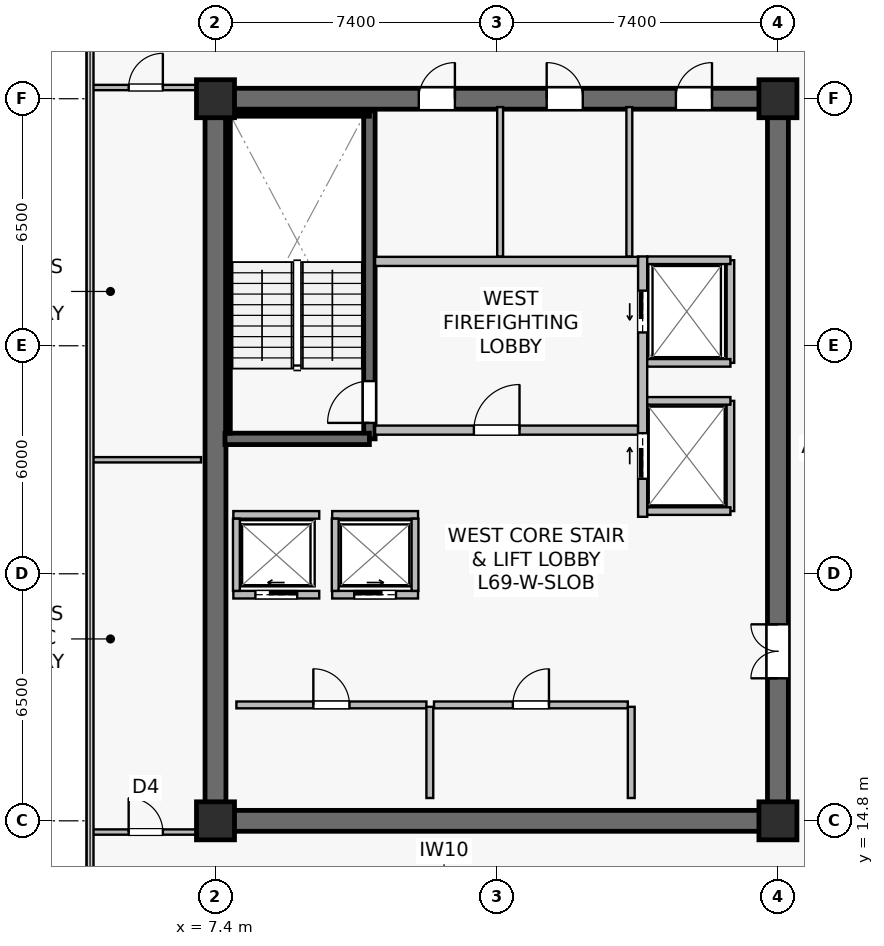
"""IFC4 building model, lengths in metres.
Left out: names, types, materials, properties, quantities, classifications, styles, units other than length and angle.
Written with IfcOpenShell. Run it as: python <this file> out.ifc"""

import sys

from ifc_helpers import new_model, si_unit, direction, frame, frame_2d, origin, origin_2d, place, context, subcontext, project, spatial, rectangle, extrude, source, transform, mapped, element, fill, save


model = new_model("IFC4")
c1 = context("Model", 3, precision=1e-05, world=origin(), true_north=direction((0.0, 1.0)))
c2 = subcontext(c1, "Body", "Model", "MODEL_VIEW")
j1 = project(units=[si_unit("LENGTHUNIT", "METRE"), si_unit("PLANEANGLEUNIT", "RADIAN")], contexts=[c1])
p1 = place(None, origin())
s1 = spatial("IfcSite", under=j1, at=p1, CompositionType="ELEMENT")
p2 = place(p1, origin())
s2 = spatial("IfcBuilding", under=s1, at=p2, CompositionType="ELEMENT")
p3 = place(p2, frame((0.0, 0.0, 287.5)))
s3 = spatial("IfcBuildingStorey", under=s2, at=p3, CompositionType="ELEMENT", Elevation=287.5)
p4 = place(p3, frame((7.125, 14.8, 0.0), z_axis=(0.0, 0.0, 1.0), x_axis=(1.0, 0.0, 0.0)))
e1 = element("IfcWall", 1, at=p4, inside=s3, PredefinedType="SHEAR", context=c2, shape_type="SweptSolid", body=[
    extrude(rectangle(XDim=15.35, YDim=0.55, at=frame_2d((7.675, 0.0))), origin(), (0.0, 0.0, 1.0), 3.8),
])
p5 = place(p3, frame((7.125, 33.8, 0.0), z_axis=(0.0, 0.0, 1.0), x_axis=(1.0, 0.0, 0.0)))
e2 = element("IfcWall", 2, at=p5, inside=s3, PredefinedType="SHEAR", context=c2, shape_type="SweptSolid", body=[
    extrude(rectangle(XDim=15.35, YDim=0.55, at=frame_2d((7.675, 0.0))), origin(), (0.0, 0.0, 1.0), 3.8),
])
p6 = place(p5, frame((5.625, 0.0, 0.0)))
e3 = element("IfcOpeningElement", 3, at=p6, cuts=e2, PredefinedType="OPENING", context=c2, shape_type="SweptSolid", body=[
    extrude(rectangle(XDim=0.95, YDim=2.15, at=frame_2d((0.475, 1.075))), frame((0.0, 0.285, 0.0), z_axis=(0.0, -1.0, 0.0), x_axis=(1.0, 0.0, 0.0)), (0.0, 0.0, 1.0), 0.57),
])
p7 = place(p5, frame((8.99, 0.0, 0.0)))
e4 = element("IfcOpeningElement", 4, at=p7, cuts=e2, PredefinedType="OPENING", context=c2, shape_type="SweptSolid", body=[
    extrude(rectangle(XDim=0.95, YDim=2.15, at=frame_2d((0.475, 1.075))), frame((0.0, 0.285, 0.0), z_axis=(0.0, -1.0, 0.0), x_axis=(1.0, 0.0, 0.0)), (0.0, 0.0, 1.0), 0.57),
])
p8 = place(p5, frame((12.39, 0.0, 0.0)))
e5 = element("IfcOpeningElement", 5, at=p8, cuts=e2, PredefinedType="OPENING", context=c2, shape_type="SweptSolid", body=[
    extrude(rectangle(XDim=0.95, YDim=2.15, at=frame_2d((0.475, 1.075))), frame((0.0, 0.285, 0.0), z_axis=(0.0, -1.0, 0.0), x_axis=(1.0, 0.0, 0.0)), (0.0, 0.0, 1.0), 0.57),
])
p9 = place(p3, frame((7.4, 15.075, 0.0), z_axis=(0.0, 0.0, 1.0), x_axis=(0.0, 1.0, 0.0)))
e6 = element("IfcWall", 6, at=p9, inside=s3, PredefinedType="SHEAR", context=c2, shape_type="SweptSolid", body=[
    extrude(rectangle(XDim=18.45, YDim=0.55, at=frame_2d((9.225, 0.0))), origin(), (0.0, 0.0, 1.0), 3.8),
])
p10 = place(p3, frame((22.2, 15.075, 0.0), z_axis=(0.0, 0.0, 1.0), x_axis=(0.0, 1.0, 0.0)))
e7 = element("IfcWall", 7, at=p10, inside=s3, PredefinedType="SHEAR", context=c2, shape_type="SweptSolid", body=[
    extrude(rectangle(XDim=18.45, YDim=0.55, at=frame_2d((9.225, 0.0))), origin(), (0.0, 0.0, 1.0), 3.8),
])
p11 = place(p10, frame((3.475, 0.0, 0.0)))
e8 = element("IfcOpeningElement", 8, at=p11, cuts=e7, PredefinedType="OPENING", context=c2, shape_type="SweptSolid", body=[
    extrude(rectangle(XDim=1.42, YDim=2.2, at=frame_2d((0.71, 1.1))), frame((0.0, 0.285, 0.0), z_axis=(0.0, -1.0, 0.0), x_axis=(1.0, 0.0, 0.0)), (0.0, 0.0, 1.0), 0.57),
])
p12 = place(p3, frame((11.45, 24.85, 0.0), z_axis=(0.0, 0.0, 1.0), x_axis=(0.0, 1.0, 0.0)))
e9 = element("IfcWall", 9, at=p12, inside=s3, PredefinedType="SHEAR", context=c2, shape_type="SweptSolid", body=[
    extrude(rectangle(XDim=8.63, YDim=0.3, at=frame_2d((4.315, 0.0))), origin(), (0.0, 0.0, 1.0), 3.8),
])
p13 = place(p12, frame((0.42, 0.0, 0.0)))
e10 = element("IfcOpeningElement", 10, at=p13, cuts=e9, PredefinedType="OPENING", context=c2, shape_type="SweptSolid", body=[
    extrude(rectangle(XDim=1.1, YDim=2.15, at=frame_2d((0.55, 1.075))), frame((0.0, 0.16, 0.0), z_axis=(0.0, -1.0, 0.0), x_axis=(1.0, 0.0, 0.0)), (0.0, 0.0, 1.0), 0.32),
])
p14 = place(p3, frame((7.65, 24.85, 0.0), z_axis=(0.0, 0.0, 1.0), x_axis=(1.0, 0.0, 0.0)))
e11 = element("IfcWall", 11, at=p14, inside=s3, PredefinedType="SHEAR", context=c2, shape_type="SweptSolid", body=[
    extrude(rectangle(XDim=3.8, YDim=0.3, at=frame_2d((1.9, 0.0))), origin(), (0.0, 0.0, 1.0), 3.8),
])
p15 = place(p3, frame((7.73, 33.4, 0.0), z_axis=(0.0, 0.0, 1.0), x_axis=(1.0, 0.0, 0.0)))
e12 = element("IfcWall", 12, at=p15, inside=s3, PredefinedType="SOLIDWALL", context=c2, shape_type="SweptSolid", body=[
    extrude(rectangle(XDim=3.72, YDim=0.12, at=frame_2d((1.86, 0.0))), origin(), (0.0, 0.0, 1.0), 3.8),
])
p16 = place(p3, frame((7.73, 25.0, 0.0), z_axis=(0.0, 0.0, 1.0), x_axis=(0.0, 1.0, 0.0)))
e13 = element("IfcWall", 13, at=p16, inside=s3, PredefinedType="SOLIDWALL", context=c2, shape_type="SweptSolid", body=[
    extrude(rectangle(XDim=8.32, YDim=0.12, at=frame_2d((4.16, 0.0))), origin(), (0.0, 0.0, 1.0), 3.8),
])
m1 = source(origin(), c2, "Body", "SweptSolid", [
    extrude(rectangle(XDim=1.0, YDim=1.0, at=origin_2d()), origin(), (0.0, 0.0, 1.0), 4.1),
])
for number, where, z_axis, x_axis in (
    (14, (7.4, 14.8, 0.0), (0.0, 0.0, 1.0), (1.0, 0.0, 0.0)),
    (15, (22.2, 14.8, 0.0), (0.0, 0.0, 1.0), (1.0, 0.0, 0.0)),
    (16, (7.4, 33.8, 0.0), (0.0, 0.0, 1.0), (1.0, 0.0, 0.0)),
    (17, (22.2, 33.8, 0.0), (0.0, 0.0, 1.0), (1.0, 0.0, 0.0)),
):
    element("IfcColumn", number, at=place(p3, frame(where, z_axis=z_axis, x_axis=x_axis)), inside=s3, PredefinedType="COLUMN", context=c2, shape_type="MappedRepresentation", body=[
        mapped(m1, transform((0.0, 0.0, 0.0), scale=1.0)),
    ])
p17 = place(p3, frame((11.6, 25.08, 0.0), z_axis=(0.0, 0.0, 1.0), x_axis=(1.0, 0.0, 0.0)))
e18 = element("IfcWall", 18, at=p17, inside=s3, PredefinedType="SOLIDWALL", context=c2, shape_type="SweptSolid", body=[
    extrude(rectangle(XDim=6.92, YDim=0.24, at=frame_2d((3.46, 0.0))), origin(), (0.0, 0.0, 1.0), 3.197),
])
p18 = place(p17, frame((2.6, 0.0, 0.0)))
e19 = element("IfcOpeningElement", 19, at=p18, cuts=e18, PredefinedType="OPENING", context=c2, shape_type="SweptSolid", body=[
    extrude(rectangle(XDim=1.2, YDim=2.16, at=frame_2d((0.6, 1.08))), frame((0.0, 0.13, 0.0), z_axis=(0.0, -1.0, 0.0), x_axis=(1.0, 0.0, 0.0)), (0.0, 0.0, 1.0), 0.26),
])
p19 = place(p3, frame((11.6, 29.52, 0.0), z_axis=(0.0, 0.0, 1.0), x_axis=(1.0, 0.0, 0.0)))
e20 = element("IfcWall", 20, at=p19, inside=s3, PredefinedType="SOLIDWALL", context=c2, shape_type="SweptSolid", body=[
    extrude(rectangle(XDim=6.92, YDim=0.24, at=frame_2d((3.46, 0.0))), origin(), (0.0, 0.0, 1.0), 3.197),
])
p20 = place(p3, frame((18.64, 22.8, 0.0), z_axis=(0.0, 0.0, 1.0), x_axis=(0.0, 1.0, 0.0)))
e21 = element("IfcWall", 21, at=p20, inside=s3, PredefinedType="SOLIDWALL", context=c2, shape_type="SweptSolid", body=[
    extrude(rectangle(XDim=6.85, YDim=0.24, at=frame_2d((3.425, 0.0))), origin(), (0.0, 0.0, 1.0), 2.935),
])
p21 = place(p20, frame((4.85, 0.0, 0.0)))
e22 = element("IfcOpeningElement", 22, at=p21, cuts=e21, PredefinedType="OPENING", context=c2, shape_type="SweptSolid", body=[
    extrude(rectangle(XDim=1.1, YDim=2.22, at=frame_2d((0.55, 1.11))), frame((0.0, 0.13, 0.0), z_axis=(0.0, -1.0, 0.0), x_axis=(1.0, 0.0, 0.0)), (0.0, 0.0, 1.0), 0.26),
])
p22 = place(p20, frame((1.0, 0.0, 0.0)))
e23 = element("IfcOpeningElement", 23, at=p22, cuts=e21, PredefinedType="OPENING", context=c2, shape_type="SweptSolid", body=[
    extrude(rectangle(XDim=1.2, YDim=2.22, at=frame_2d((0.6, 1.11))), frame((0.0, 0.13, 0.0), z_axis=(0.0, -1.0, 0.0), x_axis=(1.0, 0.0, 0.0)), (0.0, 0.0, 1.0), 0.26),
])
p23 = place(p3, frame((7.87, 20.75, 0.0), z_axis=(0.0, 0.0, 1.0), x_axis=(1.0, 0.0, 0.0)))
e24 = element("IfcWall", 24, at=p23, inside=s3, PredefinedType="SOLIDWALL", context=c2, shape_type="SweptSolid", body=[
    extrude(rectangle(XDim=2.26, YDim=0.2, at=frame_2d((1.13, 0.0))), origin(), (0.0, 0.0, 1.0), 3.8),
])
p24 = place(p23, frame((0.58, 0.0, 0.0)))
e25 = element("IfcOpeningElement", 25, at=p24, cuts=e24, PredefinedType="OPENING", context=c2, shape_type="SweptSolid", body=[
    extrude(rectangle(XDim=1.1, YDim=2.22, at=frame_2d((0.55, 1.11))), frame((0.0, 0.11, 0.0), z_axis=(0.0, -1.0, 0.0), x_axis=(1.0, 0.0, 0.0)), (0.0, 0.0, 1.0), 0.22),
])
p25 = place(p3, frame((7.87, 22.85, 0.0), z_axis=(0.0, 0.0, 1.0), x_axis=(1.0, 0.0, 0.0)))
e26 = element("IfcWall", 26, at=p25, inside=s3, PredefinedType="SOLIDWALL", context=c2, shape_type="SweptSolid", body=[
    extrude(rectangle(XDim=2.26, YDim=0.2, at=frame_2d((1.13, 0.0))), origin(), (0.0, 0.0, 1.0), 3.8),
])
p26 = place(p3, frame((7.95, 20.85, 0.0), z_axis=(0.0, 0.0, 1.0), x_axis=(0.0, 1.0, 0.0)))
e27 = element("IfcWall", 27, at=p26, inside=s3, PredefinedType="SOLIDWALL", context=c2, shape_type="SweptSolid", body=[
    extrude(rectangle(XDim=1.9, YDim=0.18, at=frame_2d((0.95, 0.0))), origin(), (0.0, 0.0, 1.0), 3.8),
])
p27 = place(p3, frame((10.47, 20.75, 0.0), z_axis=(0.0, 0.0, 1.0), x_axis=(1.0, 0.0, 0.0)))
e28 = element("IfcWall", 28, at=p27, inside=s3, PredefinedType="SOLIDWALL", context=c2, shape_type="SweptSolid", body=[
    extrude(rectangle(XDim=2.26, YDim=0.2, at=frame_2d((1.13, 0.0))), origin(), (0.0, 0.0, 1.0), 3.8),
])
p28 = place(p27, frame((0.58, 0.0, 0.0)))
e29 = element("IfcOpeningElement", 29, at=p28, cuts=e28, PredefinedType="OPENING", context=c2, shape_type="SweptSolid", body=[
    extrude(rectangle(XDim=1.1, YDim=2.22, at=frame_2d((0.55, 1.11))), frame((0.0, 0.11, 0.0), z_axis=(0.0, -1.0, 0.0), x_axis=(1.0, 0.0, 0.0)), (0.0, 0.0, 1.0), 0.22),
])
p29 = place(p3, frame((10.47, 22.85, 0.0), z_axis=(0.0, 0.0, 1.0), x_axis=(1.0, 0.0, 0.0)))
e30 = element("IfcWall", 30, at=p29, inside=s3, PredefinedType="SOLIDWALL", context=c2, shape_type="SweptSolid", body=[
    extrude(rectangle(XDim=2.26, YDim=0.2, at=frame_2d((1.13, 0.0))), origin(), (0.0, 0.0, 1.0), 3.8),
])
for number, where, z_axis, x_axis in (
    (31, (10.55, 20.85, 0.0), (0.0, 0.0, 1.0), (0.0, 1.0, 0.0)),
    (32, (12.65, 20.85, 0.0), (0.0, 0.0, 1.0), (0.0, 1.0, 0.0)),
):
    element("IfcWall", number, at=place(p3, frame(where, z_axis=z_axis, x_axis=x_axis)), inside=s3, PredefinedType="SOLIDWALL", context=c2, shape_type="SweptSolid", body=[
        extrude(rectangle(XDim=1.9, YDim=0.18, at=frame_2d((0.95, 0.0))), origin(), (0.0, 0.0, 1.0), 3.8),
    ])
p30 = place(p3, frame((20.95, 26.85, 0.0), z_axis=(0.0, 0.0, 1.0), x_axis=(0.0, 1.0, 0.0)))
e33 = element("IfcWall", 33, at=p30, inside=s3, PredefinedType="SOLIDWALL", context=c2, shape_type="SweptSolid", body=[
    extrude(rectangle(XDim=2.7, YDim=0.2, at=frame_2d((1.35, 0.0))), origin(), (0.0, 0.0, 1.0), 3.8),
])
p31 = place(p3, frame((18.76, 29.55, 0.0), z_axis=(0.0, 0.0, 1.0), x_axis=(1.0, 0.0, 0.0)))
e34 = element("IfcWall", 34, at=p31, inside=s3, PredefinedType="SOLIDWALL", context=c2, shape_type="SweptSolid", body=[
    extrude(rectangle(XDim=2.19, YDim=0.2, at=frame_2d((1.095, 0.0))), origin(), (0.0, 0.0, 1.0), 3.8),
])
p32 = place(p3, frame((18.76, 26.85, 0.0), z_axis=(0.0, 0.0, 1.0), x_axis=(1.0, 0.0, 0.0)))
e35 = element("IfcWall", 35, at=p32, inside=s3, PredefinedType="SOLIDWALL", context=c2, shape_type="SweptSolid", body=[
    extrude(rectangle(XDim=2.19, YDim=0.2, at=frame_2d((1.095, 0.0))), origin(), (0.0, 0.0, 1.0), 3.197),
])
p33 = place(p3, frame((20.95, 22.95, 0.0), z_axis=(0.0, 0.0, 1.0), x_axis=(0.0, 1.0, 0.0)))
e36 = element("IfcWall", 36, at=p33, inside=s3, PredefinedType="SOLIDWALL", context=c2, shape_type="SweptSolid", body=[
    extrude(rectangle(XDim=2.9, YDim=0.2, at=frame_2d((1.45, 0.0))), origin(), (0.0, 0.0, 1.0), 2.935),
])
for number, where, z_axis, x_axis in (
    (37, (18.76, 25.85, 0.0), (0.0, 0.0, 1.0), (1.0, 0.0, 0.0)),
    (38, (18.76, 22.95, 0.0), (0.0, 0.0, 1.0), (1.0, 0.0, 0.0)),
):
    element("IfcWall", number, at=place(p3, frame(where, z_axis=z_axis, x_axis=x_axis)), inside=s3, PredefinedType="SOLIDWALL", context=c2, shape_type="SweptSolid", body=[
        extrude(rectangle(XDim=2.19, YDim=0.2, at=frame_2d((1.095, 0.0))), origin(), (0.0, 0.0, 1.0), 3.8),
    ])
p34 = place(p3, frame((7.95, 17.85, 0.0), z_axis=(0.0, 0.0, 1.0), x_axis=(1.0, 0.0, 0.0)))
e39 = element("IfcWall", 39, at=p34, inside=s3, PredefinedType="SOLIDWALL", context=c2, shape_type="SweptSolid", body=[
    extrude(rectangle(XDim=5.0, YDim=0.18, at=frame_2d((2.5, 0.0))), origin(), (0.0, 0.0, 1.0), 3.8),
])
p35 = place(p34, frame((2.025, 0.0, 0.0)))
e40 = element("IfcOpeningElement", 40, at=p35, cuts=e39, PredefinedType="OPENING", context=c2, shape_type="SweptSolid", body=[
    extrude(rectangle(XDim=0.95, YDim=2.15, at=frame_2d((0.475, 1.075))), frame((0.0, 0.1, 0.0), z_axis=(0.0, -1.0, 0.0), x_axis=(1.0, 0.0, 0.0)), (0.0, 0.0, 1.0), 0.2),
])
p36 = place(p3, frame((13.04, 15.4, 0.0), z_axis=(0.0, 0.0, 1.0), x_axis=(0.0, 1.0, 0.0)))
e41 = element("IfcWall", 41, at=p36, inside=s3, PredefinedType="SOLIDWALL", context=c2, shape_type="SweptSolid", body=[
    extrude(rectangle(XDim=2.4, YDim=0.18, at=frame_2d((1.2, 0.0))), origin(), (0.0, 0.0, 1.0), 3.8),
])
p37 = place(p3, frame((13.15, 17.85, 0.0), z_axis=(0.0, 0.0, 1.0), x_axis=(1.0, 0.0, 0.0)))
e42 = element("IfcWall", 42, at=p37, inside=s3, PredefinedType="SOLIDWALL", context=c2, shape_type="SweptSolid", body=[
    extrude(rectangle(XDim=5.1, YDim=0.18, at=frame_2d((2.55, 0.0))), origin(), (0.0, 0.0, 1.0), 3.197),
])
p38 = place(p37, frame((2.075, 0.0, 0.0)))
e43 = element("IfcOpeningElement", 43, at=p38, cuts=e42, PredefinedType="OPENING", context=c2, shape_type="SweptSolid", body=[
    extrude(rectangle(XDim=0.95, YDim=2.15, at=frame_2d((0.475, 1.075))), frame((0.0, 0.1, 0.0), z_axis=(0.0, -1.0, 0.0), x_axis=(1.0, 0.0, 0.0)), (0.0, 0.0, 1.0), 0.2),
])
p39 = place(p3, frame((18.34, 15.4, 0.0), z_axis=(0.0, 0.0, 1.0), x_axis=(0.0, 1.0, 0.0)))
e44 = element("IfcWall", 44, at=p39, inside=s3, PredefinedType="SOLIDWALL", context=c2, shape_type="SweptSolid", body=[
    extrude(rectangle(XDim=2.4, YDim=0.18, at=frame_2d((1.2, 0.0))), origin(), (0.0, 0.0, 1.0), 3.8),
])
p40 = place(p3, frame((14.89, 29.65, 0.0), z_axis=(0.0, 0.0, 1.0), x_axis=(0.0, 1.0, 0.0)))
e45 = element("IfcWall", 45, at=p40, inside=s3, PredefinedType="PLUMBINGWALL", context=c2, shape_type="SweptSolid", body=[
    extrude(rectangle(XDim=3.93, YDim=0.155, at=frame_2d((1.965, 0.0))), origin(), (0.0, 0.0, 1.0), 3.197),
])
p41 = place(p3, frame((18.29, 29.65, 0.0), z_axis=(0.0, 0.0, 1.0), x_axis=(0.0, 1.0, 0.0)))
e46 = element("IfcWall", 46, at=p41, inside=s3, PredefinedType="PLUMBINGWALL", context=c2, shape_type="SweptSolid", body=[
    extrude(rectangle(XDim=3.93, YDim=0.155, at=frame_2d((1.965, 0.0))), origin(), (0.0, 0.0, 1.0), 3.8),
])
p42 = place(p3, frame((4.11, 24.3, 0.0), z_axis=(0.0, 0.0, 1.0), x_axis=(1.0, 0.0, 0.0)))
e47 = element("IfcWall", 47, at=p42, inside=s3, PredefinedType="PARTITIONING", context=c2, shape_type="SweptSolid", body=[
    extrude(rectangle(XDim=2.91, YDim=0.14, at=frame_2d((1.455, 0.0))), origin(), (0.0, 0.0, 1.0), 3.8),
])
p43 = place(p3, frame((4.11, 14.505, 0.0), z_axis=(0.0, 0.0, 1.0), x_axis=(1.0, 0.0, 0.0)))
e48 = element("IfcWall", 48, at=p43, inside=s3, PredefinedType="PARTITIONING", context=c2, shape_type="SweptSolid", body=[
    extrude(rectangle(XDim=2.91, YDim=0.14, at=frame_2d((1.455, 0.0))), origin(), (0.0, 0.0, 1.0), 3.8),
])
p44 = place(p43, frame((1.005, 0.0, 0.0)))
e49 = element("IfcOpeningElement", 49, at=p44, cuts=e48, PredefinedType="OPENING", context=c2, shape_type="SweptSolid", body=[
    extrude(rectangle(XDim=0.9, YDim=2.1, at=frame_2d((0.45, 1.05))), frame((0.0, 0.08, 0.0), z_axis=(0.0, -1.0, 0.0), x_axis=(1.0, 0.0, 0.0)), (0.0, 0.0, 1.0), 0.16),
])
p45 = place(p3, frame((4.11, 34.095, 0.0), z_axis=(0.0, 0.0, 1.0), x_axis=(1.0, 0.0, 0.0)))
e50 = element("IfcWall", 50, at=p45, inside=s3, PredefinedType="PARTITIONING", context=c2, shape_type="SweptSolid", body=[
    extrude(rectangle(XDim=2.91, YDim=0.14, at=frame_2d((1.455, 0.0))), origin(), (0.0, 0.0, 1.0), 3.8),
])
p46 = place(p45, frame((1.005, 0.0, 0.0)))
e51 = element("IfcOpeningElement", 51, at=p46, cuts=e50, PredefinedType="OPENING", context=c2, shape_type="SweptSolid", body=[
    extrude(rectangle(XDim=0.9, YDim=2.1, at=frame_2d((0.45, 1.05))), frame((0.0, 0.08, 0.0), z_axis=(0.0, -1.0, 0.0), x_axis=(1.0, 0.0, 0.0)), (0.0, 0.0, 1.0), 0.16),
])
m2 = source(origin(), c2, "Body", "SweptSolid", [
    extrude(rectangle(XDim=1.1, YDim=2.15, at=frame_2d((0.55, 1.075))), frame((0.0, 0.025, 0.0), z_axis=(0.0, -1.0, 0.0), x_axis=(1.0, 0.0, 0.0)), (0.0, 0.0, 1.0), 0.05),
])
p47 = place(p13, origin())
e52 = element("IfcDoor", 52, at=p47, inside=s3, OperationType="SINGLE_SWING_LEFT", PredefinedType="DOOR", context=c2, shape_type="MappedRepresentation", body=[
    mapped(m2, transform((0.0, 0.0, 0.0), scale=1.0)),
])
fill(e10, e52)
m3 = source(origin(), c2, "Body", "SweptSolid", [
    extrude(rectangle(XDim=1.2, YDim=2.16, at=frame_2d((0.6, 1.08))), frame((0.0, 0.025, 0.0), z_axis=(0.0, -1.0, 0.0), x_axis=(1.0, 0.0, 0.0)), (0.0, 0.0, 1.0), 0.05),
])
p48 = place(p18, origin())
e53 = element("IfcDoor", 53, at=p48, inside=s3, OperationType="SINGLE_SWING_RIGHT", PredefinedType="DOOR", context=c2, shape_type="MappedRepresentation", body=[
    mapped(m3, transform((0.0, 0.0, 0.0), scale=1.0)),
])
fill(e19, e53)
m4 = source(origin(), c2, "Body", "SweptSolid", [
    extrude(rectangle(XDim=1.1, YDim=2.22, at=frame_2d((0.55, 1.11))), frame((0.0, 0.025, 0.0), z_axis=(0.0, -1.0, 0.0), x_axis=(1.0, 0.0, 0.0)), (0.0, 0.0, 1.0), 0.05),
])
p49 = place(p24, origin())
e54 = element("IfcDoor", 54, at=p49, inside=s3, OperationType="SLIDING_TO_LEFT", PredefinedType="USERDEFINED", context=c2, shape_type="MappedRepresentation", body=[
    mapped(m4, transform((0.0, 0.0, 0.0), scale=1.0)),
])
fill(e25, e54)
p50 = place(p28, origin())
e55 = element("IfcDoor", 55, at=p50, inside=s3, OperationType="SLIDING_TO_RIGHT", PredefinedType="USERDEFINED", context=c2, shape_type="MappedRepresentation", body=[
    mapped(m4, transform((0.0, 0.0, 0.0), scale=1.0)),
])
fill(e29, e55)
p51 = place(p21, origin())
e56 = element("IfcDoor", 56, at=p51, inside=s3, OperationType="SLIDING_TO_LEFT", PredefinedType="USERDEFINED", context=c2, shape_type="MappedRepresentation", body=[
    mapped(m4, transform((0.0, 0.0, 0.0), scale=1.0)),
])
fill(e22, e56)
m5 = source(origin(), c2, "Body", "SweptSolid", [
    extrude(rectangle(XDim=1.2, YDim=2.22, at=frame_2d((0.6, 1.11))), frame((0.0, 0.025, 0.0), z_axis=(0.0, -1.0, 0.0), x_axis=(1.0, 0.0, 0.0)), (0.0, 0.0, 1.0), 0.05),
])
p52 = place(p22, origin())
e57 = element("IfcDoor", 57, at=p52, inside=s3, OperationType="SLIDING_TO_RIGHT", PredefinedType="USERDEFINED", context=c2, shape_type="MappedRepresentation", body=[
    mapped(m5, transform((0.0, 0.0, 0.0), scale=1.0)),
])
fill(e23, e57)
m6 = source(origin(), c2, "Body", "SweptSolid", [
    extrude(rectangle(XDim=0.95, YDim=2.15, at=frame_2d((0.475, 1.075))), frame((0.0, 0.025, 0.0), z_axis=(0.0, -1.0, 0.0), x_axis=(1.0, 0.0, 0.0)), (0.0, 0.0, 1.0), 0.05),
])
p53 = place(p35, origin())
e58 = element("IfcDoor", 58, at=p53, inside=s3, OperationType="SINGLE_SWING_LEFT", PredefinedType="DOOR", context=c2, shape_type="MappedRepresentation", body=[
    mapped(m6, transform((0.0, 0.0, 0.0), scale=1.0)),
])
fill(e40, e58)
p54 = place(p38, origin())
e59 = element("IfcDoor", 59, at=p54, inside=s3, OperationType="SINGLE_SWING_RIGHT", PredefinedType="DOOR", context=c2, shape_type="MappedRepresentation", body=[
    mapped(m6, transform((0.0, 0.0, 0.0), scale=1.0)),
])
fill(e43, e59)
m7 = source(origin(), c2, "Body", "SweptSolid", [
    extrude(rectangle(XDim=1.42, YDim=2.2, at=frame_2d((0.71, 1.1))), frame((0.0, 0.025, 0.0), z_axis=(0.0, -1.0, 0.0), x_axis=(1.0, 0.0, 0.0)), (0.0, 0.0, 1.0), 0.05),
])
p55 = place(p11, origin())
e60 = element("IfcDoor", 60, at=p55, inside=s3, OperationType="DOUBLE_DOOR_SINGLE_SWING", PredefinedType="DOOR", context=c2, shape_type="MappedRepresentation", body=[
    mapped(m7, transform((0.0, 0.0, 0.0), scale=1.0)),
])
fill(e8, e60)
p56 = place(p6, origin())
e61 = element("IfcDoor", 61, at=p56, inside=s3, OperationType="SINGLE_SWING_RIGHT", PredefinedType="DOOR", context=c2, shape_type="MappedRepresentation", body=[
    mapped(m6, transform((0.0, 0.0, 0.0), scale=1.0)),
])
fill(e3, e61)
p57 = place(p7, origin())
e62 = element("IfcDoor", 62, at=p57, inside=s3, OperationType="SINGLE_SWING_LEFT", PredefinedType="DOOR", context=c2, shape_type="MappedRepresentation", body=[
    mapped(m6, transform((0.0, 0.0, 0.0), scale=1.0)),
])
fill(e4, e62)
p58 = place(p8, origin())
e63 = element("IfcDoor", 63, at=p58, inside=s3, OperationType="SINGLE_SWING_RIGHT", PredefinedType="DOOR", context=c2, shape_type="MappedRepresentation", body=[
    mapped(m6, transform((0.0, 0.0, 0.0), scale=1.0)),
])
fill(e5, e63)
m8 = source(origin(), c2, "Body", "SweptSolid", [
    extrude(rectangle(XDim=0.9, YDim=2.1, at=frame_2d((0.45, 1.05))), frame((0.0, 0.025, 0.0), z_axis=(0.0, -1.0, 0.0), x_axis=(1.0, 0.0, 0.0)), (0.0, 0.0, 1.0), 0.05),
])
p59 = place(p44, origin())
e64 = element("IfcDoor", 64, at=p59, inside=s3, OperationType="SINGLE_SWING_LEFT", PredefinedType="DOOR", context=c2, shape_type="MappedRepresentation", body=[
    mapped(m8, transform((0.0, 0.0, 0.0), scale=1.0)),
])
fill(e49, e64)
p60 = place(p46, origin())
e65 = element("IfcDoor", 65, at=p60, inside=s3, OperationType="SINGLE_SWING_RIGHT", PredefinedType="DOOR", context=c2, shape_type="MappedRepresentation", body=[
    mapped(m8, transform((0.0, 0.0, 0.0), scale=1.0)),
])
fill(e51, e65)
save(model, sys.argv[1])
